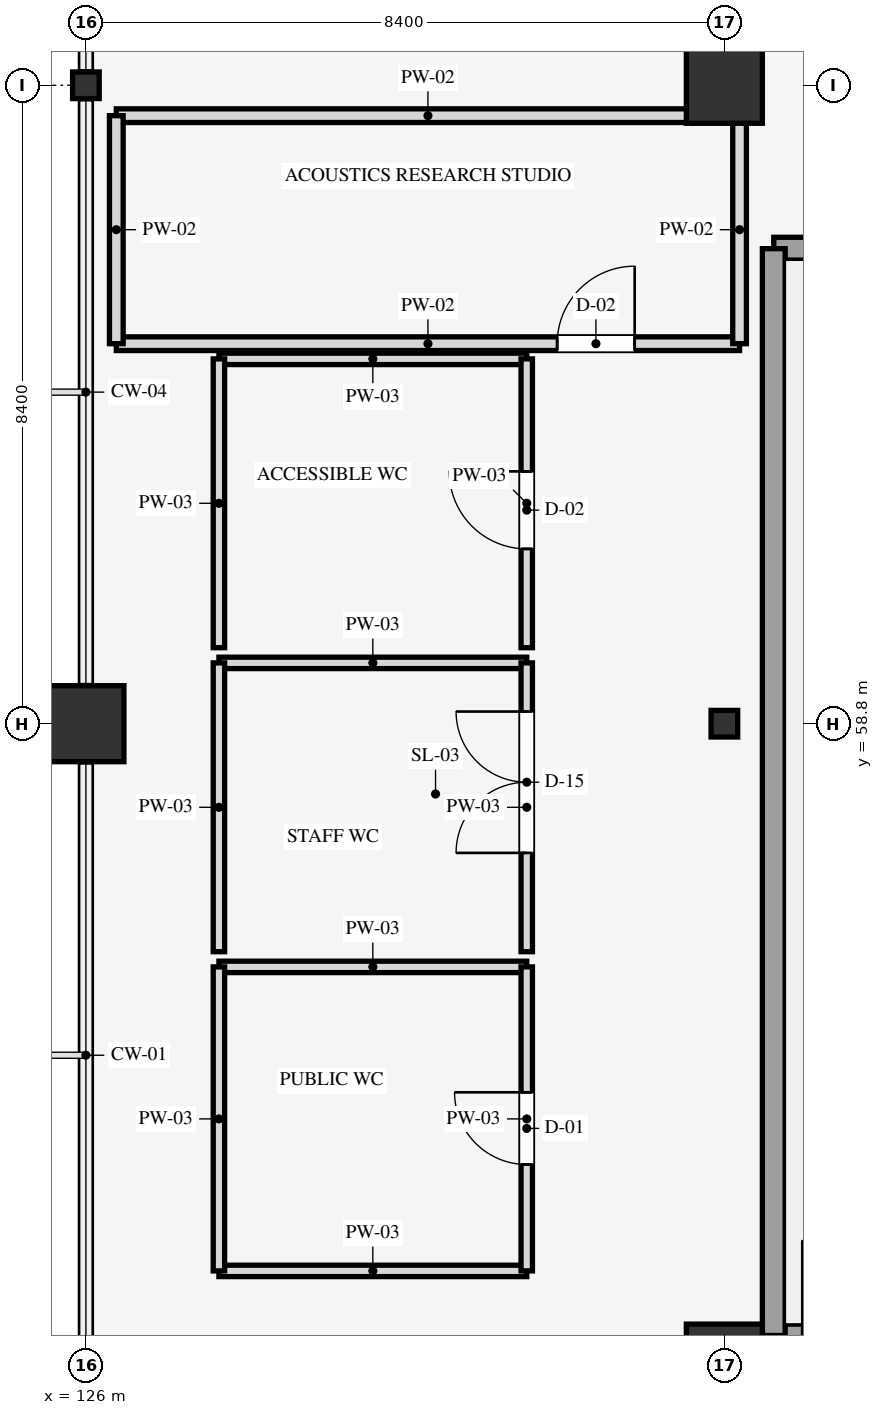
"""IFC4 building model, lengths in metres.
Left out: names, types, materials, properties, quantities, classifications, styles, units other than length and angle.
Written with IfcOpenShell. Run it as: python <this file> out.ifc"""

import sys

from ifc_helpers import new_model, si_unit, direction, frame, frame_2d, origin, origin_2d, place, context, subcontext, project, spatial, rectangle, i_section, extrude, element, fill, save


model = new_model("IFC4")
c1 = context("Model", 3, precision=1e-05, world=origin(), true_north=direction((0.0, 1.0)))
c2 = subcontext(c1, "Body", "Model", "MODEL_VIEW")
j1 = project(units=[si_unit("LENGTHUNIT", "METRE"), si_unit("PLANEANGLEUNIT", "RADIAN")], contexts=[c1])
p1 = place(None, origin())
s1 = spatial("IfcSite", under=j1, at=p1, CompositionType="ELEMENT")
p2 = place(p1, origin())
s2 = spatial("IfcBuilding", under=s1, at=p2, CompositionType="ELEMENT")
p3 = place(p2, frame((0.0, 0.0, 48.9)))
s3 = spatial("IfcBuildingStorey", under=s2, at=p3, CompositionType="ELEMENT", Elevation=48.9)
p4 = place(p3, frame((126.0, 58.8, 0.0), z_axis=(0.0, 0.0, 1.0), x_axis=(1.0, 0.0, 0.0)))
e1 = element("IfcColumn", 1, at=p4, inside=s3, PredefinedType="COLUMN", context=c2, shape_type="SweptSolid", body=[
    extrude(rectangle(XDim=1.0, YDim=1.0, at=origin_2d()), origin(), (0.0, 0.0, 1.0), 4.2),
])
p5 = place(p3, frame((126.0, 67.2, 0.0), z_axis=(0.0, 0.0, 1.0), x_axis=(1.0, 0.0, 0.0)))
e2 = element("IfcColumn", 2, at=p5, inside=s3, PredefinedType="COLUMN", context=c2, shape_type="SweptSolid", body=[
    extrude(i_section(OverallWidth=0.35, OverallDepth=0.35, WebThickness=0.012, FlangeThickness=0.019, FilletRadius=0.02, at=origin_2d()), origin(), (0.0, 0.0, 1.0), 4.2),
])
p6 = place(p3, frame((134.4, 50.4, 0.0), z_axis=(0.0, 0.0, 1.0), x_axis=(1.0, 0.0, 0.0)))
e3 = element("IfcColumn", 3, at=p6, inside=s3, PredefinedType="COLUMN", context=c2, shape_type="SweptSolid", body=[
    extrude(rectangle(XDim=1.0, YDim=1.0, at=origin_2d()), origin(), (0.0, 0.0, 1.0), 4.2),
])
p7 = place(p3, frame((134.4, 58.8, 0.0), z_axis=(0.0, 0.0, 1.0), x_axis=(1.0, 0.0, 0.0)))
e4 = element("IfcColumn", 4, at=p7, inside=s3, PredefinedType="COLUMN", context=c2, shape_type="SweptSolid", body=[
    extrude(i_section(OverallWidth=0.35, OverallDepth=0.35, WebThickness=0.012, FlangeThickness=0.019, FilletRadius=0.02, at=origin_2d()), origin(), (0.0, 0.0, 1.0), 4.2),
])
p8 = place(p3, frame((134.4, 67.2, 0.0), z_axis=(0.0, 0.0, 1.0), x_axis=(1.0, 0.0, 0.0)))
e5 = element("IfcColumn", 5, at=p8, inside=s3, PredefinedType="COLUMN", context=c2, shape_type="SweptSolid", body=[
    extrude(rectangle(XDim=1.0, YDim=1.0, at=origin_2d()), origin(), (0.0, 0.0, 1.0), 4.2),
])
p9 = place(p3, frame((135.05, 50.75, 0.0), z_axis=(0.0, 0.0, 1.0), x_axis=(1.0, 0.0, 0.0)))
e6 = element("IfcWall", 6, at=p9, inside=s3, PredefinedType="SHEAR", context=c2, shape_type="SweptSolid", body=[
    extrude(rectangle(XDim=4.0, YDim=0.3, at=frame_2d((2.0, 0.0))), origin(), (0.0, 0.0, 1.0), 4.2),
])
p10 = place(p9, frame((0.375, 0.0, 0.0)))
e7 = element("IfcOpeningElement", 7, at=p10, cuts=e6, PredefinedType="OPENING", context=c2, shape_type="SweptSolid", body=[
    extrude(rectangle(XDim=1.25, YDim=2.15, at=frame_2d((0.625, 1.075))), frame((0.0, 0.16, 0.0), z_axis=(0.0, -1.0, 0.0), x_axis=(1.0, 0.0, 0.0)), (0.0, 0.0, 1.0), 0.32),
])
p11 = place(p3, frame((135.05, 65.05, 0.0), z_axis=(0.0, 0.0, 1.0), x_axis=(1.0, 0.0, 0.0)))
e8 = element("IfcWall", 8, at=p11, inside=s3, PredefinedType="SHEAR", context=c2, shape_type="SweptSolid", body=[
    extrude(rectangle(XDim=4.0, YDim=0.3, at=frame_2d((2.0, 0.0))), origin(), (0.0, 0.0, 1.0), 4.2),
])
p12 = place(p3, frame((135.05, 50.75, 0.0), z_axis=(0.0, 0.0, 1.0), x_axis=(0.0, 1.0, 0.0)))
e9 = element("IfcWall", 9, at=p12, inside=s3, PredefinedType="SHEAR", context=c2, shape_type="SweptSolid", body=[
    extrude(rectangle(XDim=14.3, YDim=0.3, at=frame_2d((7.15, 0.0))), origin(), (0.0, 0.0, 1.0), 4.2),
])
for number, where, z_axis, x_axis in (
    (10, (127.75, 51.6, 0.0), (0.0, 0.0, 1.0), (1.0, 0.0, 0.0)),
    (11, (127.75, 55.6, 0.0), (0.0, 0.0, 1.0), (1.0, 0.0, 0.0)),
):
    element("IfcWall", number, at=place(p3, frame(where, z_axis=z_axis, x_axis=x_axis)), inside=s3, PredefinedType="PARTITIONING", context=c2, shape_type="SweptSolid", body=[
        extrude(rectangle(XDim=4.05, YDim=0.15, at=frame_2d((2.025, 0.0))), origin(), (0.0, 0.0, 1.0), 3.24),
    ])
p13 = place(p3, frame((127.75, 51.6, 0.0), z_axis=(0.0, 0.0, 1.0), x_axis=(0.0, 1.0, 0.0)))
e12 = element("IfcWall", 12, at=p13, inside=s3, PredefinedType="PARTITIONING", context=c2, shape_type="SweptSolid", body=[
    extrude(rectangle(XDim=4.0, YDim=0.15, at=frame_2d((2.0, 0.0))), origin(), (0.0, 0.0, 1.0), 3.24),
])
p14 = place(p3, frame((131.8, 51.6, 0.0), z_axis=(0.0, 0.0, 1.0), x_axis=(0.0, 1.0, 0.0)))
e13 = element("IfcWall", 13, at=p14, inside=s3, PredefinedType="PARTITIONING", context=c2, shape_type="SweptSolid", body=[
    extrude(rectangle(XDim=4.0, YDim=0.15, at=frame_2d((2.0, 0.0))), origin(), (0.0, 0.0, 1.0), 3.24),
])
p15 = place(p14, frame((1.4, 0.0, 0.0)))
e14 = element("IfcOpeningElement", 14, at=p15, cuts=e13, PredefinedType="OPENING", context=c2, shape_type="SweptSolid", body=[
    extrude(rectangle(XDim=0.95, YDim=2.1, at=frame_2d((0.475, 1.05))), frame((0.0, 0.085, 0.0), z_axis=(0.0, -1.0, 0.0), x_axis=(1.0, 0.0, 0.0)), (0.0, 0.0, 1.0), 0.17),
])
p16 = place(p3, frame((127.75, 59.6, 0.0), z_axis=(0.0, 0.0, 1.0), x_axis=(1.0, 0.0, 0.0)))
e15 = element("IfcWall", 15, at=p16, inside=s3, PredefinedType="PARTITIONING", context=c2, shape_type="SweptSolid", body=[
    extrude(rectangle(XDim=4.05, YDim=0.15, at=frame_2d((2.025, 0.0))), origin(), (0.0, 0.0, 1.0), 3.24),
])
p17 = place(p3, frame((127.75, 55.8, 0.0), z_axis=(0.0, 0.0, 1.0), x_axis=(0.0, 1.0, 0.0)))
e16 = element("IfcWall", 16, at=p17, inside=s3, PredefinedType="PARTITIONING", context=c2, shape_type="SweptSolid", body=[
    extrude(rectangle(XDim=3.8, YDim=0.15, at=frame_2d((1.9, 0.0))), origin(), (0.0, 0.0, 1.0), 3.24),
])
p18 = place(p3, frame((131.8, 55.8, 0.0), z_axis=(0.0, 0.0, 1.0), x_axis=(0.0, 1.0, 0.0)))
e17 = element("IfcWall", 17, at=p18, inside=s3, PredefinedType="PARTITIONING", context=c2, shape_type="SweptSolid", body=[
    extrude(rectangle(XDim=3.8, YDim=0.15, at=frame_2d((1.9, 0.0))), origin(), (0.0, 0.0, 1.0), 3.24),
])
p19 = place(p18, frame((1.3, 0.0, 0.0)))
e18 = element("IfcOpeningElement", 18, at=p19, cuts=e17, PredefinedType="OPENING", context=c2, shape_type="SweptSolid", body=[
    extrude(rectangle(XDim=1.86, YDim=2.26, at=frame_2d((0.93, 1.13))), frame((0.0, 0.085, 0.0), z_axis=(0.0, -1.0, 0.0), x_axis=(1.0, 0.0, 0.0)), (0.0, 0.0, 1.0), 0.17),
])
p20 = place(p3, frame((127.75, 63.6, 0.0), z_axis=(0.0, 0.0, 1.0), x_axis=(1.0, 0.0, 0.0)))
e19 = element("IfcWall", 19, at=p20, inside=s3, PredefinedType="PARTITIONING", context=c2, shape_type="SweptSolid", body=[
    extrude(rectangle(XDim=4.05, YDim=0.15, at=frame_2d((2.025, 0.0))), origin(), (0.0, 0.0, 1.0), 3.24),
])
p21 = place(p3, frame((127.75, 59.8, 0.0), z_axis=(0.0, 0.0, 1.0), x_axis=(0.0, 1.0, 0.0)))
e20 = element("IfcWall", 20, at=p21, inside=s3, PredefinedType="PARTITIONING", context=c2, shape_type="SweptSolid", body=[
    extrude(rectangle(XDim=3.8, YDim=0.15, at=frame_2d((1.9, 0.0))), origin(), (0.0, 0.0, 1.0), 3.24),
])
p22 = place(p3, frame((131.8, 59.8, 0.0), z_axis=(0.0, 0.0, 1.0), x_axis=(0.0, 1.0, 0.0)))
e21 = element("IfcWall", 21, at=p22, inside=s3, PredefinedType="PARTITIONING", context=c2, shape_type="SweptSolid", body=[
    extrude(rectangle(XDim=3.8, YDim=0.15, at=frame_2d((1.9, 0.0))), origin(), (0.0, 0.0, 1.0), 3.24),
])
p23 = place(p22, frame((1.3, 0.0, 0.0)))
e22 = element("IfcOpeningElement", 22, at=p23, cuts=e21, PredefinedType="OPENING", context=c2, shape_type="SweptSolid", body=[
    extrude(rectangle(XDim=1.02, YDim=2.1, at=frame_2d((0.51, 1.05))), frame((0.0, 0.085, 0.0), z_axis=(0.0, -1.0, 0.0), x_axis=(1.0, 0.0, 0.0)), (0.0, 0.0, 1.0), 0.17),
])
p24 = place(p3, frame((126.4, 63.8, 0.0), z_axis=(0.0, 0.0, 1.0), x_axis=(1.0, 0.0, 0.0)))
e23 = element("IfcWall", 23, at=p24, inside=s3, PredefinedType="PARTITIONING", context=c2, shape_type="SweptSolid", body=[
    extrude(rectangle(XDim=8.2, YDim=0.18, at=frame_2d((4.1, 0.0))), origin(), (0.0, 0.0, 1.0), 3.24),
])
p25 = place(p24, frame((5.8, 0.0, 0.0)))
e24 = element("IfcOpeningElement", 24, at=p25, cuts=e23, PredefinedType="OPENING", context=c2, shape_type="SweptSolid", body=[
    extrude(rectangle(XDim=1.02, YDim=2.1, at=frame_2d((0.51, 1.05))), frame((0.0, 0.1, 0.0), z_axis=(0.0, -1.0, 0.0), x_axis=(1.0, 0.0, 0.0)), (0.0, 0.0, 1.0), 0.2),
])
p26 = place(p3, frame((126.4, 66.8, 0.0), z_axis=(0.0, 0.0, 1.0), x_axis=(1.0, 0.0, 0.0)))
e25 = element("IfcWall", 25, at=p26, inside=s3, PredefinedType="PARTITIONING", context=c2, shape_type="SweptSolid", body=[
    extrude(rectangle(XDim=8.2, YDim=0.18, at=frame_2d((4.1, 0.0))), origin(), (0.0, 0.0, 1.0), 3.24),
])
for number, where, z_axis, x_axis in (
    (26, (126.4, 63.8, 0.0), (0.0, 0.0, 1.0), (0.0, 1.0, 0.0)),
    (27, (134.6, 63.8, 0.0), (0.0, 0.0, 1.0), (0.0, 1.0, 0.0)),
):
    element("IfcWall", number, at=place(p3, frame(where, z_axis=z_axis, x_axis=x_axis)), inside=s3, PredefinedType="PARTITIONING", context=c2, shape_type="SweptSolid", body=[
        extrude(rectangle(XDim=3.0, YDim=0.18, at=frame_2d((1.5, 0.0))), origin(), (0.0, 0.0, 1.0), 3.24),
    ])
p27 = place(p10, origin())
e28 = element("IfcDoor", 28, at=p27, inside=s3, OperationType="SINGLE_SWING_LEFT", PredefinedType="DOOR", context=c2, shape_type="SweptSolid", body=[
    extrude(rectangle(XDim=1.25, YDim=2.15, at=frame_2d((0.625, 1.075))), frame((0.0, 0.025, 0.0), z_axis=(0.0, -1.0, 0.0), x_axis=(1.0, 0.0, 0.0)), (0.0, 0.0, 1.0), 0.05),
])
fill(e7, e28)
p28 = place(p15, origin())
e29 = element("IfcDoor", 29, at=p28, inside=s3, OperationType="SINGLE_SWING_RIGHT", PredefinedType="DOOR", context=c2, shape_type="SweptSolid", body=[
    extrude(rectangle(XDim=0.95, YDim=2.1, at=frame_2d((0.475, 1.05))), frame((0.0, 0.025, 0.0), z_axis=(0.0, -1.0, 0.0), x_axis=(1.0, 0.0, 0.0)), (0.0, 0.0, 1.0), 0.05),
])
fill(e14, e29)
p29 = place(p19, origin())
e30 = element("IfcDoor", 30, at=p29, inside=s3, OperationType="DOUBLE_DOOR_SINGLE_SWING", PredefinedType="DOOR", context=c2, shape_type="SweptSolid", body=[
    extrude(rectangle(XDim=1.86, YDim=2.26, at=frame_2d((0.93, 1.13))), frame((0.0, 0.025, 0.0), z_axis=(0.0, -1.0, 0.0), x_axis=(1.0, 0.0, 0.0)), (0.0, 0.0, 1.0), 0.05),
])
fill(e18, e30)
p30 = place(p23, origin())
e31 = element("IfcDoor", 31, at=p30, inside=s3, OperationType="SINGLE_SWING_RIGHT", PredefinedType="DOOR", context=c2, shape_type="SweptSolid", body=[
    extrude(rectangle(XDim=1.02, YDim=2.1, at=frame_2d((0.51, 1.05))), frame((0.0, 0.025, 0.0), z_axis=(0.0, -1.0, 0.0), x_axis=(1.0, 0.0, 0.0)), (0.0, 0.0, 1.0), 0.05),
])
fill(e22, e31)
p31 = place(p25, origin())
e32 = element("IfcDoor", 32, at=p31, inside=s3, OperationType="SINGLE_SWING_RIGHT", PredefinedType="DOOR", context=c2, shape_type="SweptSolid", body=[
    extrude(rectangle(XDim=1.02, YDim=2.1, at=frame_2d((0.51, 1.05))), frame((0.0, 0.025, 0.0), z_axis=(0.0, -1.0, 0.0), x_axis=(1.0, 0.0, 0.0)), (0.0, 0.0, 1.0), 0.05),
])
fill(e24, e32)
save(model, sys.argv[1])
